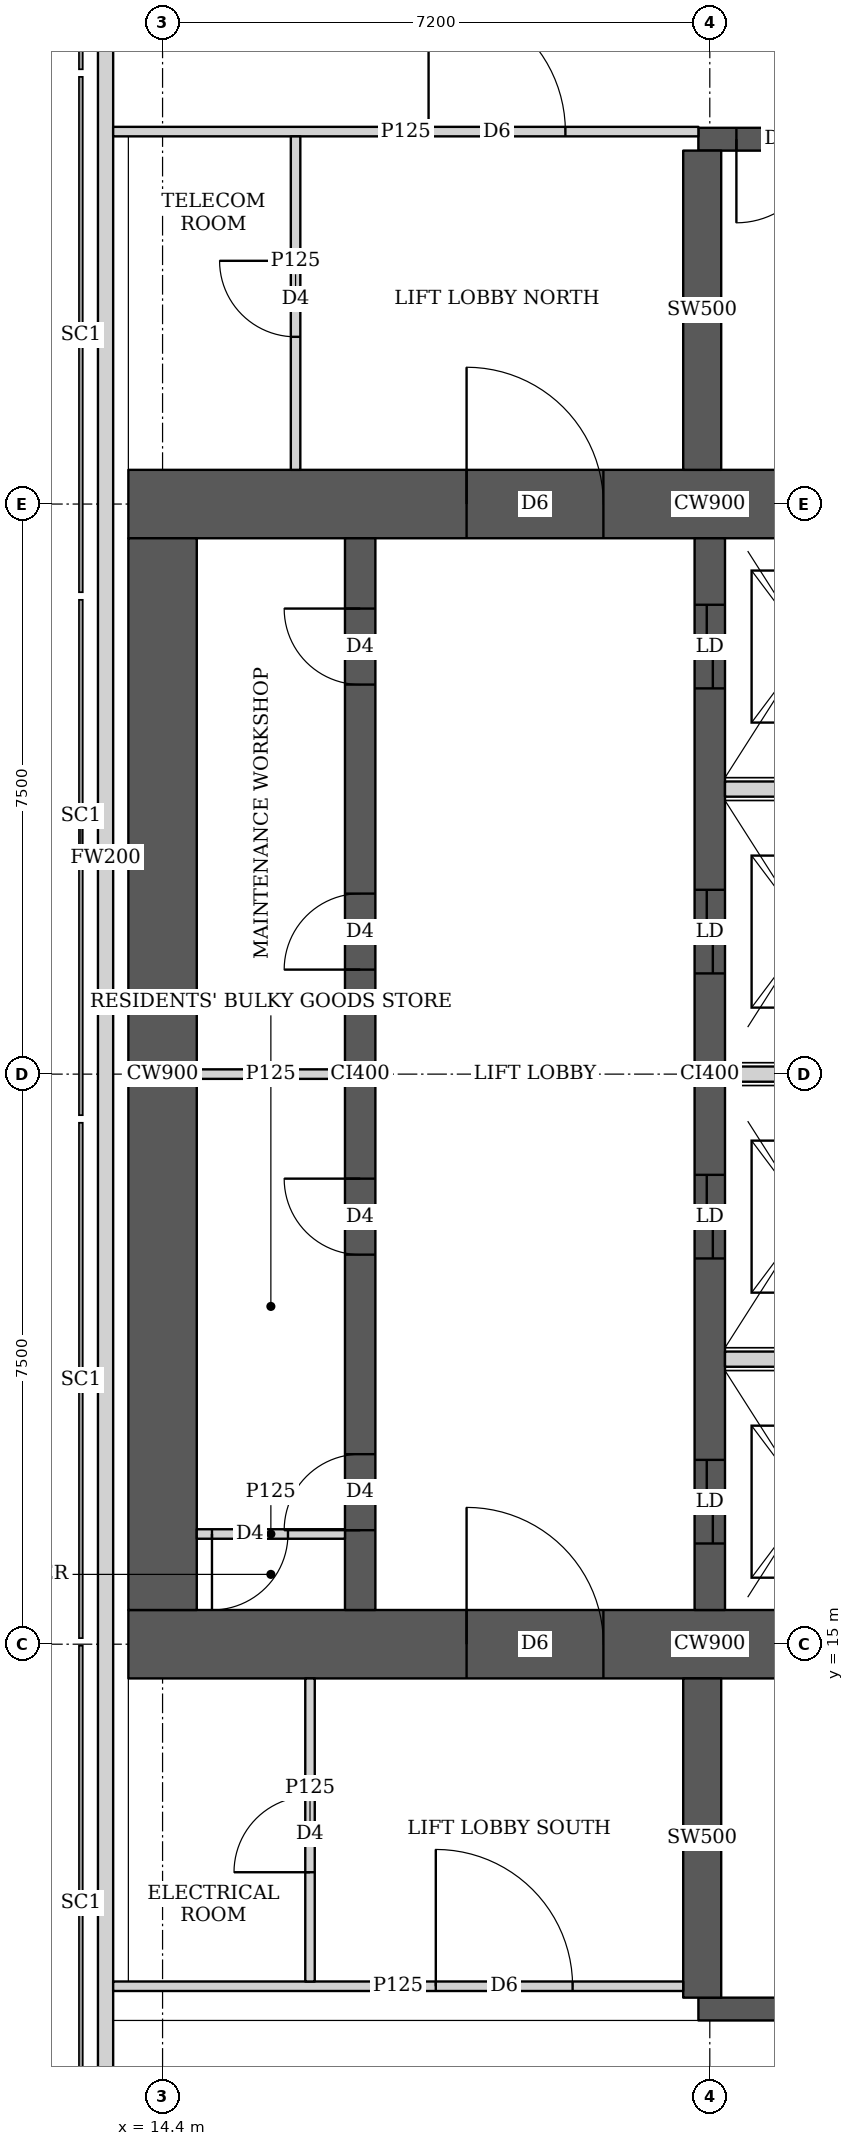
"""IFC4 building model, lengths in metres.
Left out: names, types, materials, properties, quantities, classifications, styles, units other than length and angle.
Written with IfcOpenShell. Run it as: python <this file> out.ifc"""

import sys

from ifc_helpers import new_model, si_unit, direction, frame, frame_2d, origin, place, context, subcontext, project, spatial, rectangle, extrude, element, fill, save


model = new_model("IFC4")
c1 = context("Model", 3, precision=1e-05, world=origin(), true_north=direction((0.0, 1.0)))
c2 = subcontext(c1, "Body", "Model", "MODEL_VIEW")
j1 = project(units=[si_unit("LENGTHUNIT", "METRE"), si_unit("PLANEANGLEUNIT", "RADIAN")], contexts=[c1])
p1 = place(None, origin())
s1 = spatial("IfcSite", under=j1, at=p1, CompositionType="ELEMENT")
p2 = place(p1, origin())
s2 = spatial("IfcBuilding", under=s1, at=p2, CompositionType="ELEMENT")
p3 = place(p2, frame((0.0, 0.0, 274.1)))
s3 = spatial("IfcBuildingStorey", under=s2, at=p3, CompositionType="ELEMENT", Elevation=274.1)
p4 = place(p3, frame((13.95, 15.0, 0.0), z_axis=(0.0, 0.0, 1.0), x_axis=(1.0, 0.0, 0.0)))
e1 = element("IfcWall", 1, at=p4, inside=s3, PredefinedType="SHEAR", context=c2, shape_type="SweptSolid", body=[
    extrude(rectangle(XDim=15.3, YDim=0.9, at=frame_2d((7.65, 0.0))), origin(), (0.0, 0.0, 1.0), 3.75),
])
p5 = place(p4, frame((4.45, 0.0, 0.0)))
e2 = element("IfcOpeningElement", 2, at=p5, cuts=e1, PredefinedType="OPENING", context=c2, shape_type="SweptSolid", body=[
    extrude(rectangle(XDim=1.8, YDim=2.1, at=frame_2d((0.9, 1.05))), frame((0.0, 0.46, 0.0), z_axis=(0.0, -1.0, 0.0), x_axis=(1.0, 0.0, 0.0)), (0.0, 0.0, 1.0), 0.92),
])
p6 = place(p4, frame((10.7, 0.0, 0.0)))
e3 = element("IfcOpeningElement", 3, at=p6, cuts=e1, PredefinedType="OPENING", context=c2, shape_type="SweptSolid", body=[
    extrude(rectangle(XDim=1.1, YDim=2.1, at=frame_2d((0.55, 1.05))), frame((0.0, 0.46, 0.0), z_axis=(0.0, -1.0, 0.0), x_axis=(1.0, 0.0, 0.0)), (0.0, 0.0, 1.0), 0.92),
])
p7 = place(p3, frame((13.95, 30.0, 0.0), z_axis=(0.0, 0.0, 1.0), x_axis=(1.0, 0.0, 0.0)))
e4 = element("IfcWall", 4, at=p7, inside=s3, PredefinedType="SHEAR", context=c2, shape_type="SweptSolid", body=[
    extrude(rectangle(XDim=15.3, YDim=0.9, at=frame_2d((7.65, 0.0))), origin(), (0.0, 0.0, 1.0), 3.75),
])
p8 = place(p7, frame((4.45, 0.0, 0.0)))
e5 = element("IfcOpeningElement", 5, at=p8, cuts=e4, PredefinedType="OPENING", context=c2, shape_type="SweptSolid", body=[
    extrude(rectangle(XDim=1.8, YDim=2.1, at=frame_2d((0.9, 1.05))), frame((0.0, 0.46, 0.0), z_axis=(0.0, -1.0, 0.0), x_axis=(1.0, 0.0, 0.0)), (0.0, 0.0, 1.0), 0.92),
])
p9 = place(p7, frame((10.7, 0.0, 0.0)))
e6 = element("IfcOpeningElement", 6, at=p9, cuts=e4, PredefinedType="OPENING", context=c2, shape_type="SweptSolid", body=[
    extrude(rectangle(XDim=1.1, YDim=2.1, at=frame_2d((0.55, 1.05))), frame((0.0, 0.46, 0.0), z_axis=(0.0, -1.0, 0.0), x_axis=(1.0, 0.0, 0.0)), (0.0, 0.0, 1.0), 0.92),
])
p10 = place(p3, frame((14.4, 15.45, 0.0), z_axis=(0.0, 0.0, 1.0), x_axis=(0.0, 1.0, 0.0)))
e7 = element("IfcWall", 7, at=p10, inside=s3, PredefinedType="SHEAR", context=c2, shape_type="SweptSolid", body=[
    extrude(rectangle(XDim=14.1, YDim=0.9, at=frame_2d((7.05, 0.0))), origin(), (0.0, 0.0, 1.0), 3.75),
])
p11 = place(p3, frame((17.0, 15.45, 0.0), z_axis=(0.0, 0.0, 1.0), x_axis=(0.0, 1.0, 0.0)))
e8 = element("IfcWall", 8, at=p11, inside=s3, PredefinedType="SHEAR", context=c2, shape_type="SweptSolid", body=[
    extrude(rectangle(XDim=14.1, YDim=0.4, at=frame_2d((7.05, 0.0))), origin(), (0.0, 0.0, 1.0), 3.75),
])
p12 = place(p11, frame((1.05, 0.0, 0.0)))
e9 = element("IfcOpeningElement", 9, at=p12, cuts=e8, PredefinedType="OPENING", context=c2, shape_type="SweptSolid", body=[
    extrude(rectangle(XDim=1.0, YDim=2.1, at=frame_2d((0.5, 1.05))), frame((0.0, 0.21, 0.0), z_axis=(0.0, -1.0, 0.0), x_axis=(1.0, 0.0, 0.0)), (0.0, 0.0, 1.0), 0.42),
])
p13 = place(p11, frame((4.675, 0.0, 0.0)))
e10 = element("IfcOpeningElement", 10, at=p13, cuts=e8, PredefinedType="OPENING", context=c2, shape_type="SweptSolid", body=[
    extrude(rectangle(XDim=1.0, YDim=2.1, at=frame_2d((0.5, 1.05))), frame((0.0, 0.21, 0.0), z_axis=(0.0, -1.0, 0.0), x_axis=(1.0, 0.0, 0.0)), (0.0, 0.0, 1.0), 0.42),
])
p14 = place(p11, frame((8.425, 0.0, 0.0)))
e11 = element("IfcOpeningElement", 11, at=p14, cuts=e8, PredefinedType="OPENING", context=c2, shape_type="SweptSolid", body=[
    extrude(rectangle(XDim=1.0, YDim=2.1, at=frame_2d((0.5, 1.05))), frame((0.0, 0.21, 0.0), z_axis=(0.0, -1.0, 0.0), x_axis=(1.0, 0.0, 0.0)), (0.0, 0.0, 1.0), 0.42),
])
p15 = place(p11, frame((12.175, 0.0, 0.0)))
e12 = element("IfcOpeningElement", 12, at=p15, cuts=e8, PredefinedType="OPENING", context=c2, shape_type="SweptSolid", body=[
    extrude(rectangle(XDim=1.0, YDim=2.1, at=frame_2d((0.5, 1.05))), frame((0.0, 0.21, 0.0), z_axis=(0.0, -1.0, 0.0), x_axis=(1.0, 0.0, 0.0)), (0.0, 0.0, 1.0), 0.42),
])
p16 = place(p3, frame((21.6, 15.45, 0.0), z_axis=(0.0, 0.0, 1.0), x_axis=(0.0, 1.0, 0.0)))
e13 = element("IfcWall", 13, at=p16, inside=s3, PredefinedType="SHEAR", context=c2, shape_type="SweptSolid", body=[
    extrude(rectangle(XDim=14.1, YDim=0.4, at=frame_2d((7.05, 0.0))), origin(), (0.0, 0.0, 1.0), 3.75),
])
p17 = place(p16, frame((0.875, 0.0, 0.0)))
e14 = element("IfcOpeningElement", 14, at=p17, cuts=e13, PredefinedType="OPENING", context=c2, shape_type="SweptSolid", body=[
    extrude(rectangle(XDim=1.1, YDim=2.1, at=frame_2d((0.55, 1.05))), frame((0.0, 0.21, 0.0), z_axis=(0.0, -1.0, 0.0), x_axis=(1.0, 0.0, 0.0)), (0.0, 0.0, 1.0), 0.42),
])
p18 = place(p16, frame((4.625, 0.0, 0.0)))
e15 = element("IfcOpeningElement", 15, at=p18, cuts=e13, PredefinedType="OPENING", context=c2, shape_type="SweptSolid", body=[
    extrude(rectangle(XDim=1.1, YDim=2.1, at=frame_2d((0.55, 1.05))), frame((0.0, 0.21, 0.0), z_axis=(0.0, -1.0, 0.0), x_axis=(1.0, 0.0, 0.0)), (0.0, 0.0, 1.0), 0.42),
])
p19 = place(p16, frame((8.375, 0.0, 0.0)))
e16 = element("IfcOpeningElement", 16, at=p19, cuts=e13, PredefinedType="OPENING", context=c2, shape_type="SweptSolid", body=[
    extrude(rectangle(XDim=1.1, YDim=2.1, at=frame_2d((0.55, 1.05))), frame((0.0, 0.21, 0.0), z_axis=(0.0, -1.0, 0.0), x_axis=(1.0, 0.0, 0.0)), (0.0, 0.0, 1.0), 0.42),
])
p20 = place(p16, frame((12.125, 0.0, 0.0)))
e17 = element("IfcOpeningElement", 17, at=p20, cuts=e13, PredefinedType="OPENING", context=c2, shape_type="SweptSolid", body=[
    extrude(rectangle(XDim=1.1, YDim=2.1, at=frame_2d((0.55, 1.05))), frame((0.0, 0.21, 0.0), z_axis=(0.0, -1.0, 0.0), x_axis=(1.0, 0.0, 0.0)), (0.0, 0.0, 1.0), 0.42),
])
p21 = place(p3, frame((21.45, 10.2, 0.0), z_axis=(0.0, 0.0, 1.0), x_axis=(1.0, 0.0, 0.0)))
e18 = element("IfcWall", 18, at=p21, inside=s3, PredefinedType="SHEAR", context=c2, shape_type="SweptSolid", body=[
    extrude(rectangle(XDim=7.5, YDim=0.3, at=frame_2d((3.75, 0.0))), origin(), (0.0, 0.0, 1.0), 3.75),
])
p22 = place(p21, frame((1.2, 0.0, 0.0)))
e19 = element("IfcOpeningElement", 19, at=p22, cuts=e18, PredefinedType="OPENING", context=c2, shape_type="SweptSolid", body=[
    extrude(rectangle(XDim=1.1, YDim=2.1, at=frame_2d((0.55, 1.05))), frame((0.0, 0.16, 0.0), z_axis=(0.0, -1.0, 0.0), x_axis=(1.0, 0.0, 0.0)), (0.0, 0.0, 1.0), 0.32),
])
p23 = place(p3, frame((21.5, 10.35, 0.0), z_axis=(0.0, 0.0, 1.0), x_axis=(0.0, 1.0, 0.0)))
e20 = element("IfcWall", 20, at=p23, inside=s3, PredefinedType="SHEAR", context=c2, shape_type="SweptSolid", body=[
    extrude(rectangle(XDim=4.2, YDim=0.5, at=frame_2d((2.1, 0.0))), origin(), (0.0, 0.0, 1.0), 3.75),
])
p24 = place(p3, frame((21.45, 34.8, 0.0), z_axis=(0.0, 0.0, 1.0), x_axis=(1.0, 0.0, 0.0)))
e21 = element("IfcWall", 21, at=p24, inside=s3, PredefinedType="SHEAR", context=c2, shape_type="SweptSolid", body=[
    extrude(rectangle(XDim=7.5, YDim=0.3, at=frame_2d((3.75, 0.0))), origin(), (0.0, 0.0, 1.0), 3.75),
])
p25 = place(p24, frame((0.5, 0.0, 0.0)))
e22 = element("IfcOpeningElement", 22, at=p25, cuts=e21, PredefinedType="OPENING", context=c2, shape_type="SweptSolid", body=[
    extrude(rectangle(XDim=1.1, YDim=2.1, at=frame_2d((0.55, 1.05))), frame((0.0, 0.16, 0.0), z_axis=(0.0, -1.0, 0.0), x_axis=(1.0, 0.0, 0.0)), (0.0, 0.0, 1.0), 0.32),
])
p26 = place(p3, frame((21.5, 30.45, 0.0), z_axis=(0.0, 0.0, 1.0), x_axis=(0.0, 1.0, 0.0)))
e23 = element("IfcWall", 23, at=p26, inside=s3, PredefinedType="SHEAR", context=c2, shape_type="SweptSolid", body=[
    extrude(rectangle(XDim=4.2, YDim=0.5, at=frame_2d((2.1, 0.0))), origin(), (0.0, 0.0, 1.0), 3.75),
])
p27 = place(p3, frame((13.65, 43.037, 0.0), z_axis=(0.0, 0.0, 1.0), x_axis=(0.0, -1.0, 0.0)))
e24 = element("IfcWall", 24, at=p27, inside=s3, PredefinedType="SOLIDWALL", context=c2, shape_type="SweptSolid", body=[
    extrude(rectangle(XDim=35.374, YDim=0.2, at=frame_2d((17.687, 0.0))), origin(), (0.0, 0.0, 1.0), 3.5),
])
p28 = place(p27, frame((1.959, 0.0, 0.9)))
e25 = element("IfcOpeningElement", 25, at=p28, cuts=e24, PredefinedType="OPENING", context=c2, shape_type="SweptSolid", body=[
    extrude(rectangle(XDim=1.8, YDim=1.5, at=frame_2d((0.9, 0.75))), frame((0.0, 0.11, 0.0), z_axis=(0.0, -1.0, 0.0), x_axis=(1.0, 0.0, 0.0)), (0.0, 0.0, 1.0), 0.22),
])
p29 = place(p3, frame((13.75, 10.5, 0.0), z_axis=(0.0, 0.0, 1.0), x_axis=(1.0, 0.0, 0.0)))
e26 = element("IfcWall", 26, at=p29, inside=s3, PredefinedType="PARTITIONING", context=c2, shape_type="SweptSolid", body=[
    extrude(rectangle(XDim=7.5, YDim=0.125, at=frame_2d((3.75, 0.0))), origin(), (0.0, 0.0, 1.0), 3.5),
])
p30 = place(p29, frame((4.245, 0.0, 0.0)))
e27 = element("IfcOpeningElement", 27, at=p30, cuts=e26, PredefinedType="OPENING", context=c2, shape_type="SweptSolid", body=[
    extrude(rectangle(XDim=1.8, YDim=2.1, at=frame_2d((0.9, 1.05))), frame((0.0, 0.073, 0.0), z_axis=(0.0, -1.0, 0.0), x_axis=(1.0, 0.0, 0.0)), (0.0, 0.0, 1.0), 0.145),
])
p31 = place(p3, frame((13.75, 34.9, 0.0), z_axis=(0.0, 0.0, 1.0), x_axis=(1.0, 0.0, 0.0)))
e28 = element("IfcWall", 28, at=p31, inside=s3, PredefinedType="PARTITIONING", context=c2, shape_type="SweptSolid", body=[
    extrude(rectangle(XDim=7.7, YDim=0.125, at=frame_2d((3.85, 0.0))), origin(), (0.0, 0.0, 1.0), 3.5),
])
p32 = place(p31, frame((4.15, 0.0, 0.0)))
e29 = element("IfcOpeningElement", 29, at=p32, cuts=e28, PredefinedType="OPENING", context=c2, shape_type="SweptSolid", body=[
    extrude(rectangle(XDim=1.8, YDim=2.1, at=frame_2d((0.9, 1.05))), frame((0.0, 0.073, 0.0), z_axis=(0.0, -1.0, 0.0), x_axis=(1.0, 0.0, 0.0)), (0.0, 0.0, 1.0), 0.145),
])
p33 = place(p3, frame((16.34, 10.562, 0.0), z_axis=(0.0, 0.0, 1.0), x_axis=(0.0, 1.0, 0.0)))
e30 = element("IfcWall", 30, at=p33, inside=s3, PredefinedType="PARTITIONING", context=c2, shape_type="SweptSolid", body=[
    extrude(rectangle(XDim=3.988, YDim=0.125, at=frame_2d((1.994, 0.0))), origin(), (0.0, 0.0, 1.0), 3.5),
])
p34 = place(p33, frame((1.438, 0.0, 0.0)))
e31 = element("IfcOpeningElement", 31, at=p34, cuts=e30, PredefinedType="OPENING", context=c2, shape_type="SweptSolid", body=[
    extrude(rectangle(XDim=1.0, YDim=2.1, at=frame_2d((0.5, 1.05))), frame((0.0, 0.073, 0.0), z_axis=(0.0, -1.0, 0.0), x_axis=(1.0, 0.0, 0.0)), (0.0, 0.0, 1.0), 0.145),
])
p35 = place(p3, frame((16.15, 30.45, 0.0), z_axis=(0.0, 0.0, 1.0), x_axis=(0.0, 1.0, 0.0)))
e32 = element("IfcWall", 32, at=p35, inside=s3, PredefinedType="PARTITIONING", context=c2, shape_type="SweptSolid", body=[
    extrude(rectangle(XDim=4.387, YDim=0.125, at=frame_2d((2.193, 0.0))), origin(), (0.0, 0.0, 1.0), 3.5),
])
p36 = place(p35, frame((1.75, 0.0, 0.0)))
e33 = element("IfcOpeningElement", 33, at=p36, cuts=e32, PredefinedType="OPENING", context=c2, shape_type="SweptSolid", body=[
    extrude(rectangle(XDim=1.0, YDim=2.1, at=frame_2d((0.5, 1.05))), frame((0.0, 0.073, 0.0), z_axis=(0.0, -1.0, 0.0), x_axis=(1.0, 0.0, 0.0)), (0.0, 0.0, 1.0), 0.145),
])
p37 = place(p3, frame((14.85, 16.45, 0.0), z_axis=(0.0, 0.0, 1.0), x_axis=(1.0, 0.0, 0.0)))
e34 = element("IfcWall", 34, at=p37, inside=s3, PredefinedType="PARTITIONING", context=c2, shape_type="SweptSolid", body=[
    extrude(rectangle(XDim=1.95, YDim=0.125, at=frame_2d((0.975, 0.0))), origin(), (0.0, 0.0, 1.0), 3.5),
])
p38 = place(p37, frame((0.2, 0.0, 0.0)))
e35 = element("IfcOpeningElement", 35, at=p38, cuts=e34, PredefinedType="OPENING", context=c2, shape_type="SweptSolid", body=[
    extrude(rectangle(XDim=1.0, YDim=2.1, at=frame_2d((0.5, 1.05))), frame((0.0, 0.073, 0.0), z_axis=(0.0, -1.0, 0.0), x_axis=(1.0, 0.0, 0.0)), (0.0, 0.0, 1.0), 0.145),
])
p39 = place(p3, frame((14.85, 22.5, 0.0), z_axis=(0.0, 0.0, 1.0), x_axis=(1.0, 0.0, 0.0)))
e36 = element("IfcWall", 36, at=p39, inside=s3, PredefinedType="PARTITIONING", context=c2, shape_type="SweptSolid", body=[
    extrude(rectangle(XDim=1.95, YDim=0.125, at=frame_2d((0.975, 0.0))), origin(), (0.0, 0.0, 1.0), 3.5),
])
for number, where, z_axis, x_axis in (
    (37, (21.8, 18.75, 0.0), (0.0, 0.0, 1.0), (1.0, 0.0, 0.0)),
    (38, (21.8, 22.5, 0.0), (0.0, 0.0, 1.0), (1.0, 0.0, 0.0)),
    (39, (21.8, 26.25, 0.0), (0.0, 0.0, 1.0), (1.0, 0.0, 0.0)),
):
    element("IfcWall", number, at=place(p3, frame(where, z_axis=z_axis, x_axis=x_axis)), inside=s3, PredefinedType="SOLIDWALL", context=c2, shape_type="SweptSolid", body=[
        extrude(rectangle(XDim=2.2, YDim=0.2, at=frame_2d((1.1, 0.0))), origin(), (0.0, 0.0, 1.0), 3.5),
    ])
p40 = place(p34, origin())
e40 = element("IfcDoor", 40, at=p40, inside=s3, OperationType="SINGLE_SWING_LEFT", PredefinedType="DOOR", context=c2, shape_type="SweptSolid", body=[
    extrude(rectangle(XDim=1.0, YDim=2.1, at=frame_2d((0.5, 1.05))), frame((0.0, 0.025, 0.0), z_axis=(0.0, -1.0, 0.0), x_axis=(1.0, 0.0, 0.0)), (0.0, 0.0, 1.0), 0.05),
])
fill(e31, e40)
p41 = place(p30, origin())
e41 = element("IfcDoor", 41, at=p41, inside=s3, OperationType="DOUBLE_DOOR_SINGLE_SWING", PredefinedType="DOOR", context=c2, shape_type="SweptSolid", body=[
    extrude(rectangle(XDim=1.8, YDim=2.1, at=frame_2d((0.9, 1.05))), frame((0.0, 0.025, 0.0), z_axis=(0.0, -1.0, 0.0), x_axis=(1.0, 0.0, 0.0)), (0.0, 0.0, 1.0), 0.05),
])
fill(e27, e41)
p42 = place(p36, origin())
e42 = element("IfcDoor", 42, at=p42, inside=s3, OperationType="SINGLE_SWING_RIGHT", PredefinedType="DOOR", context=c2, shape_type="SweptSolid", body=[
    extrude(rectangle(XDim=1.0, YDim=2.1, at=frame_2d((0.5, 1.05))), frame((0.0, 0.025, 0.0), z_axis=(0.0, -1.0, 0.0), x_axis=(1.0, 0.0, 0.0)), (0.0, 0.0, 1.0), 0.05),
])
fill(e33, e42)
p43 = place(p32, origin())
e43 = element("IfcDoor", 43, at=p43, inside=s3, OperationType="DOUBLE_DOOR_SINGLE_SWING", PredefinedType="DOOR", context=c2, shape_type="SweptSolid", body=[
    extrude(rectangle(XDim=1.8, YDim=2.1, at=frame_2d((0.9, 1.05))), frame((0.0, 0.025, 0.0), z_axis=(0.0, -1.0, 0.0), x_axis=(1.0, 0.0, 0.0)), (0.0, 0.0, 1.0), 0.05),
])
fill(e29, e43)
p44 = place(p38, origin())
e44 = element("IfcDoor", 44, at=p44, inside=s3, OperationType="SINGLE_SWING_RIGHT", PredefinedType="DOOR", context=c2, shape_type="SweptSolid", body=[
    extrude(rectangle(XDim=1.0, YDim=2.1, at=frame_2d((0.5, 1.05))), frame((0.0, 0.025, 0.0), z_axis=(0.0, -1.0, 0.0), x_axis=(1.0, 0.0, 0.0)), (0.0, 0.0, 1.0), 0.05),
])
fill(e35, e44)
p45 = place(p12, origin())
e45 = element("IfcDoor", 45, at=p45, inside=s3, OperationType="SINGLE_SWING_LEFT", PredefinedType="DOOR", context=c2, shape_type="SweptSolid", body=[
    extrude(rectangle(XDim=1.0, YDim=2.1, at=frame_2d((0.5, 1.05))), frame((0.0, 0.025, 0.0), z_axis=(0.0, -1.0, 0.0), x_axis=(1.0, 0.0, 0.0)), (0.0, 0.0, 1.0), 0.05),
])
fill(e9, e45)
p46 = place(p13, origin())
e46 = element("IfcDoor", 46, at=p46, inside=s3, OperationType="SINGLE_SWING_RIGHT", PredefinedType="DOOR", context=c2, shape_type="SweptSolid", body=[
    extrude(rectangle(XDim=1.0, YDim=2.1, at=frame_2d((0.5, 1.05))), frame((0.0, 0.025, 0.0), z_axis=(0.0, -1.0, 0.0), x_axis=(1.0, 0.0, 0.0)), (0.0, 0.0, 1.0), 0.05),
])
fill(e10, e46)
p47 = place(p14, origin())
e47 = element("IfcDoor", 47, at=p47, inside=s3, OperationType="SINGLE_SWING_LEFT", PredefinedType="DOOR", context=c2, shape_type="SweptSolid", body=[
    extrude(rectangle(XDim=1.0, YDim=2.1, at=frame_2d((0.5, 1.05))), frame((0.0, 0.025, 0.0), z_axis=(0.0, -1.0, 0.0), x_axis=(1.0, 0.0, 0.0)), (0.0, 0.0, 1.0), 0.05),
])
fill(e11, e47)
p48 = place(p15, origin())
e48 = element("IfcDoor", 48, at=p48, inside=s3, OperationType="SINGLE_SWING_RIGHT", PredefinedType="DOOR", context=c2, shape_type="SweptSolid", body=[
    extrude(rectangle(XDim=1.0, YDim=2.1, at=frame_2d((0.5, 1.05))), frame((0.0, 0.025, 0.0), z_axis=(0.0, -1.0, 0.0), x_axis=(1.0, 0.0, 0.0)), (0.0, 0.0, 1.0), 0.05),
])
fill(e12, e48)
p49 = place(p5, origin())
e49 = element("IfcDoor", 49, at=p49, inside=s3, OperationType="DOUBLE_DOOR_SINGLE_SWING", PredefinedType="DOOR", context=c2, shape_type="SweptSolid", body=[
    extrude(rectangle(XDim=1.8, YDim=2.1, at=frame_2d((0.9, 1.05))), frame((0.0, 0.025, 0.0), z_axis=(0.0, -1.0, 0.0), x_axis=(1.0, 0.0, 0.0)), (0.0, 0.0, 1.0), 0.05),
])
fill(e2, e49)
p50 = place(p8, origin())
e50 = element("IfcDoor", 50, at=p50, inside=s3, OperationType="DOUBLE_DOOR_SINGLE_SWING", PredefinedType="DOOR", context=c2, shape_type="SweptSolid", body=[
    extrude(rectangle(XDim=1.8, YDim=2.1, at=frame_2d((0.9, 1.05))), frame((0.0, 0.025, 0.0), z_axis=(0.0, -1.0, 0.0), x_axis=(1.0, 0.0, 0.0)), (0.0, 0.0, 1.0), 0.05),
])
fill(e5, e50)
p51 = place(p17, origin())
e51 = element("IfcDoor", 51, at=p51, inside=s3, OperationType="DOUBLE_DOOR_SLIDING", PredefinedType="DOOR", context=c2, shape_type="SweptSolid", body=[
    extrude(rectangle(XDim=1.1, YDim=2.1, at=frame_2d((0.55, 1.05))), frame((0.0, 0.025, 0.0), z_axis=(0.0, -1.0, 0.0), x_axis=(1.0, 0.0, 0.0)), (0.0, 0.0, 1.0), 0.05),
])
fill(e14, e51)
p52 = place(p18, origin())
e52 = element("IfcDoor", 52, at=p52, inside=s3, OperationType="DOUBLE_DOOR_SLIDING", PredefinedType="DOOR", context=c2, shape_type="SweptSolid", body=[
    extrude(rectangle(XDim=1.1, YDim=2.1, at=frame_2d((0.55, 1.05))), frame((0.0, 0.025, 0.0), z_axis=(0.0, -1.0, 0.0), x_axis=(1.0, 0.0, 0.0)), (0.0, 0.0, 1.0), 0.05),
])
fill(e15, e52)
p53 = place(p19, origin())
e53 = element("IfcDoor", 53, at=p53, inside=s3, OperationType="DOUBLE_DOOR_SLIDING", PredefinedType="DOOR", context=c2, shape_type="SweptSolid", body=[
    extrude(rectangle(XDim=1.1, YDim=2.1, at=frame_2d((0.55, 1.05))), frame((0.0, 0.025, 0.0), z_axis=(0.0, -1.0, 0.0), x_axis=(1.0, 0.0, 0.0)), (0.0, 0.0, 1.0), 0.05),
])
fill(e16, e53)
p54 = place(p20, origin())
e54 = element("IfcDoor", 54, at=p54, inside=s3, OperationType="DOUBLE_DOOR_SLIDING", PredefinedType="DOOR", context=c2, shape_type="SweptSolid", body=[
    extrude(rectangle(XDim=1.1, YDim=2.1, at=frame_2d((0.55, 1.05))), frame((0.0, 0.025, 0.0), z_axis=(0.0, -1.0, 0.0), x_axis=(1.0, 0.0, 0.0)), (0.0, 0.0, 1.0), 0.05),
])
fill(e17, e54)
p55 = place(p25, origin())
e55 = element("IfcDoor", 55, at=p55, inside=s3, OperationType="SINGLE_SWING_RIGHT", PredefinedType="DOOR", context=c2, shape_type="SweptSolid", body=[
    extrude(rectangle(XDim=1.1, YDim=2.1, at=frame_2d((0.55, 1.05))), frame((0.0, 0.025, 0.0), z_axis=(0.0, -1.0, 0.0), x_axis=(1.0, 0.0, 0.0)), (0.0, 0.0, 1.0), 0.05),
])
fill(e22, e55)
save(model, sys.argv[1])
